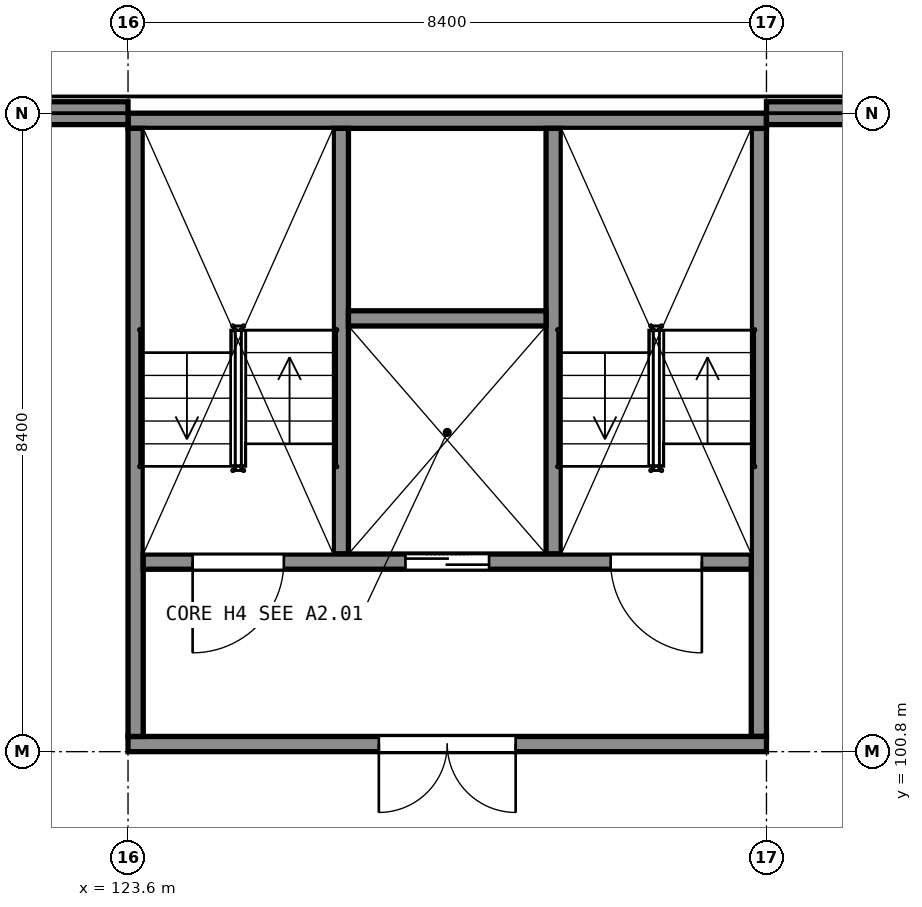
"""IFC4 building model, lengths in metres.
Left out: names, types, materials, properties, quantities, classifications, styles, units other than length and angle.
Written with IfcOpenShell. Run it as: python <this file> out.ifc"""

import sys

from ifc_helpers import new_model, si_unit, direction, frame, frame_2d, origin, place, context, subcontext, project, spatial, rectangle, extrude, element, fill, save


model = new_model("IFC4")
c1 = context("Model", 3, precision=1e-05, world=origin(), true_north=direction((0.0, 1.0)))
c2 = subcontext(c1, "Body", "Model", "MODEL_VIEW")
j1 = project(units=[si_unit("LENGTHUNIT", "METRE"), si_unit("PLANEANGLEUNIT", "RADIAN")], contexts=[c1])
p1 = place(None, origin())
s1 = spatial("IfcSite", under=j1, at=p1, CompositionType="ELEMENT")
p2 = place(p1, origin())
s2 = spatial("IfcBuilding", under=s1, at=p2, CompositionType="ELEMENT")
p3 = place(p2, frame((0.0, 0.0, 5.5)))
s3 = spatial("IfcBuildingStorey", under=s2, at=p3, CompositionType="ELEMENT", Elevation=5.5)
p4 = place(p3, frame((123.6, 100.9, 0.0), z_axis=(0.0, 0.0, 1.0), x_axis=(1.0, 0.0, 0.0)))
e1 = element("IfcWall", 1, at=p4, inside=s3, PredefinedType="SHEAR", context=c2, shape_type="SweptSolid", body=[
    extrude(rectangle(XDim=8.4, YDim=0.2, at=frame_2d((4.2, 0.0))), origin(), (0.0, 0.0, 1.0), 5.0),
])
p5 = place(p4, frame((3.3, 0.0, 0.0)))
e2 = element("IfcOpeningElement", 2, at=p5, cuts=e1, PredefinedType="OPENING", context=c2, shape_type="SweptSolid", body=[
    extrude(rectangle(XDim=1.8, YDim=2.1, at=frame_2d((0.9, 1.05))), frame((0.0, 0.11, 0.0), z_axis=(0.0, -1.0, 0.0), x_axis=(1.0, 0.0, 0.0)), (0.0, 0.0, 1.0), 0.22),
])
p6 = place(p3, frame((123.6, 109.1, 0.0), z_axis=(0.0, 0.0, 1.0), x_axis=(1.0, 0.0, 0.0)))
e3 = element("IfcWall", 3, at=p6, inside=s3, PredefinedType="SHEAR", context=c2, shape_type="SweptSolid", body=[
    extrude(rectangle(XDim=8.4, YDim=0.2, at=frame_2d((4.2, 0.0))), origin(), (0.0, 0.0, 1.0), 5.0),
])
for number, where, z_axis, x_axis in (
    (4, (123.7, 101.0, 0.0), (0.0, 0.0, 1.0), (0.0, 1.0, 0.0)),
    (5, (131.9, 101.0, 0.0), (0.0, 0.0, 1.0), (0.0, 1.0, 0.0)),
):
    element("IfcWall", number, at=place(p3, frame(where, z_axis=z_axis, x_axis=x_axis)), inside=s3, PredefinedType="SHEAR", context=c2, shape_type="SweptSolid", body=[
        extrude(rectangle(XDim=8.0, YDim=0.2, at=frame_2d((4.0, 0.0))), origin(), (0.0, 0.0, 1.0), 5.0),
    ])
p7 = place(p3, frame((123.8, 103.3, 0.0), z_axis=(0.0, 0.0, 1.0), x_axis=(1.0, 0.0, 0.0)))
e6 = element("IfcWall", 6, at=p7, inside=s3, PredefinedType="SHEAR", context=c2, shape_type="SweptSolid", body=[
    extrude(rectangle(XDim=8.0, YDim=0.2, at=frame_2d((4.0, 0.0))), origin(), (0.0, 0.0, 1.0), 5.0),
])
p8 = place(p7, frame((0.65, 0.0, 0.0)))
e7 = element("IfcOpeningElement", 7, at=p8, cuts=e6, PredefinedType="OPENING", context=c2, shape_type="SweptSolid", body=[
    extrude(rectangle(XDim=1.2, YDim=2.1, at=frame_2d((0.6, 1.05))), frame((0.0, 0.11, 0.0), z_axis=(0.0, -1.0, 0.0), x_axis=(1.0, 0.0, 0.0)), (0.0, 0.0, 1.0), 0.22),
])
p9 = place(p7, frame((6.15, 0.0, 0.0)))
e8 = element("IfcOpeningElement", 8, at=p9, cuts=e6, PredefinedType="OPENING", context=c2, shape_type="SweptSolid", body=[
    extrude(rectangle(XDim=1.2, YDim=2.1, at=frame_2d((0.6, 1.05))), frame((0.0, 0.11, 0.0), z_axis=(0.0, -1.0, 0.0), x_axis=(1.0, 0.0, 0.0)), (0.0, 0.0, 1.0), 0.22),
])
p10 = place(p7, frame((3.45, 0.0, 0.0)))
e9 = element("IfcOpeningElement", 9, at=p10, cuts=e6, PredefinedType="OPENING", context=c2, shape_type="SweptSolid", body=[
    extrude(rectangle(XDim=1.1, YDim=2.1, at=frame_2d((0.55, 1.05))), frame((0.0, 0.11, 0.0), z_axis=(0.0, -1.0, 0.0), x_axis=(1.0, 0.0, 0.0)), (0.0, 0.0, 1.0), 0.22),
])
for number, where, z_axis, x_axis in (
    (10, (126.4, 103.4, 0.0), (0.0, 0.0, 1.0), (0.0, 1.0, 0.0)),
    (11, (129.2, 103.4, 0.0), (0.0, 0.0, 1.0), (0.0, 1.0, 0.0)),
):
    element("IfcWall", number, at=place(p3, frame(where, z_axis=z_axis, x_axis=x_axis)), inside=s3, PredefinedType="SHEAR", context=c2, shape_type="SweptSolid", body=[
        extrude(rectangle(XDim=5.6, YDim=0.2, at=frame_2d((2.8, 0.0))), origin(), (0.0, 0.0, 1.0), 5.0),
    ])
p11 = place(p3, frame((126.5, 106.5, 0.0), z_axis=(0.0, 0.0, 1.0), x_axis=(1.0, 0.0, 0.0)))
e12 = element("IfcWall", 12, at=p11, inside=s3, PredefinedType="SHEAR", context=c2, shape_type="SweptSolid", body=[
    extrude(rectangle(XDim=2.6, YDim=0.2, at=frame_2d((1.3, 0.0))), origin(), (0.0, 0.0, 1.0), 5.0),
])
p12 = place(p3, frame((132.0, 109.2, 0.0), z_axis=(0.0, 0.0, 1.0), x_axis=(1.0, 0.0, 0.0)))
e13 = element("IfcWall", 13, at=p12, inside=s3, PredefinedType="SOLIDWALL", context=c2, shape_type="SweptSolid", body=[
    extrude(rectangle(XDim=8.4, YDim=0.3, at=frame_2d((4.2, 0.0))), origin(), (0.0, 0.0, 1.0), 3.94),
])
p13 = place(p3, frame((115.6, 109.2, 0.0), z_axis=(0.0, 0.0, 1.0), x_axis=(1.0, 0.0, 0.0)))
e14 = element("IfcWall", 14, at=p13, inside=s3, PredefinedType="SOLIDWALL", context=c2, shape_type="SweptSolid", body=[
    extrude(rectangle(XDim=8.0, YDim=0.3, at=frame_2d((4.0, 0.0))), origin(), (0.0, 0.0, 1.0), 3.94),
])
p14 = place(p5, origin())
e15 = element("IfcDoor", 15, at=p14, inside=s3, OperationType="DOUBLE_DOOR_SINGLE_SWING", PredefinedType="DOOR", context=c2, shape_type="SweptSolid", body=[
    extrude(rectangle(XDim=1.8, YDim=2.1, at=frame_2d((0.9, 1.05))), frame((0.0, 0.025, 0.0), z_axis=(0.0, -1.0, 0.0), x_axis=(1.0, 0.0, 0.0)), (0.0, 0.0, 1.0), 0.05),
])
fill(e2, e15)
p15 = place(p8, origin())
e16 = element("IfcDoor", 16, at=p15, inside=s3, OperationType="SINGLE_SWING_LEFT", PredefinedType="DOOR", context=c2, shape_type="SweptSolid", body=[
    extrude(rectangle(XDim=1.2, YDim=2.1, at=frame_2d((0.6, 1.05))), frame((0.0, 0.025, 0.0), z_axis=(0.0, -1.0, 0.0), x_axis=(1.0, 0.0, 0.0)), (0.0, 0.0, 1.0), 0.05),
])
fill(e7, e16)
p16 = place(p9, origin())
e17 = element("IfcDoor", 17, at=p16, inside=s3, OperationType="SINGLE_SWING_RIGHT", PredefinedType="DOOR", context=c2, shape_type="SweptSolid", body=[
    extrude(rectangle(XDim=1.2, YDim=2.1, at=frame_2d((0.6, 1.05))), frame((0.0, 0.025, 0.0), z_axis=(0.0, -1.0, 0.0), x_axis=(1.0, 0.0, 0.0)), (0.0, 0.0, 1.0), 0.05),
])
fill(e8, e17)
p17 = place(p10, origin())
e18 = element("IfcDoor", 18, at=p17, inside=s3, OperationType="DOUBLE_DOOR_SLIDING", PredefinedType="DOOR", context=c2, shape_type="SweptSolid", body=[
    extrude(rectangle(XDim=1.1, YDim=2.1, at=frame_2d((0.55, 1.05))), frame((0.0, 0.025, 0.0), z_axis=(0.0, -1.0, 0.0), x_axis=(1.0, 0.0, 0.0)), (0.0, 0.0, 1.0), 0.05),
])
fill(e9, e18)
save(model, sys.argv[1])
